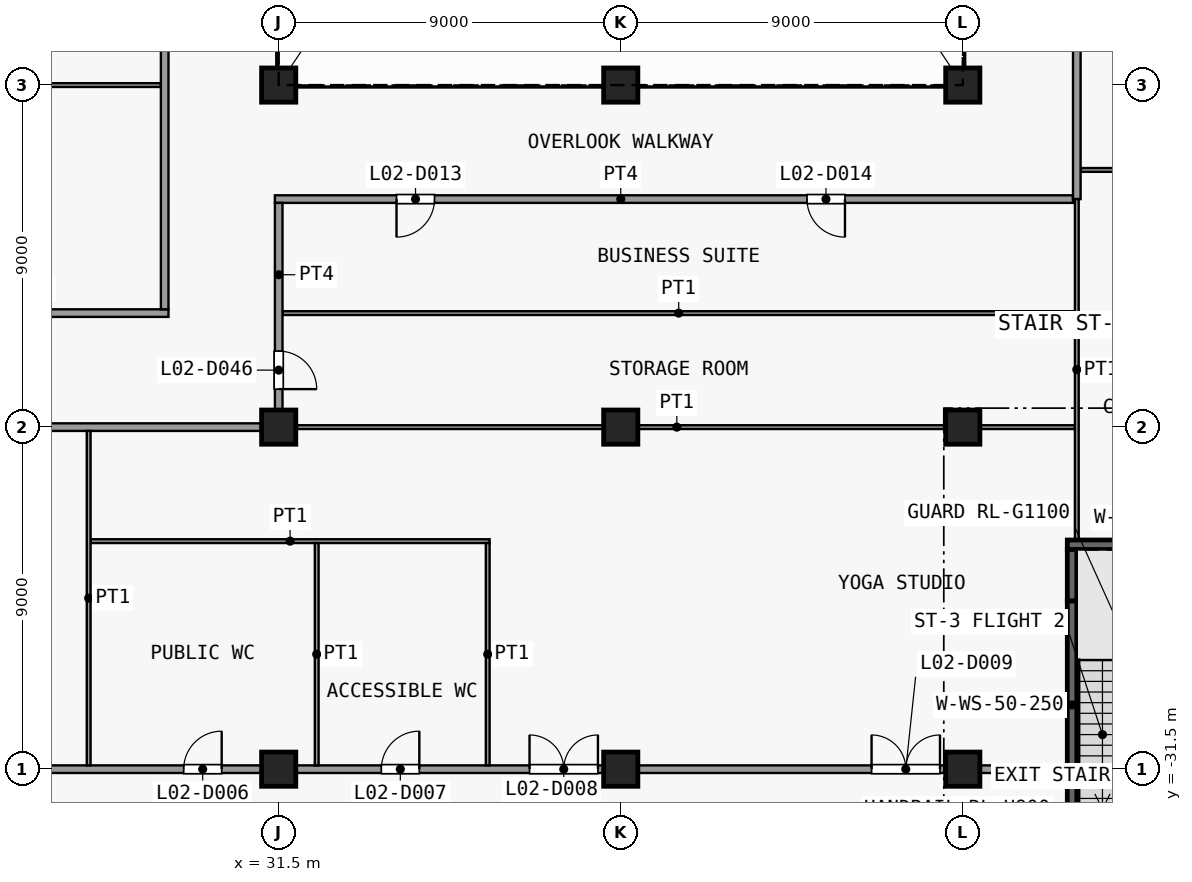
"""IFC4 building model, lengths in metres.
Left out: names, types, materials, properties, quantities, classifications, styles, units other than length and angle.
Written with IfcOpenShell. Run it as: python <this file> out.ifc"""

import sys

from ifc_helpers import new_model, si_unit, direction, frame, frame_2d, origin, origin_2d, place, context, subcontext, project, spatial, rectangle, extrude, element, fill, save


model = new_model("IFC4")
c1 = context("Model", 3, precision=1e-05, world=origin(), true_north=direction((0.0, 1.0)))
c2 = subcontext(c1, "Body", "Model", "MODEL_VIEW")
j1 = project(units=[si_unit("LENGTHUNIT", "METRE"), si_unit("PLANEANGLEUNIT", "RADIAN")], contexts=[c1])
p1 = place(None, origin())
s1 = spatial("IfcSite", under=j1, at=p1, CompositionType="ELEMENT")
p2 = place(p1, origin())
s2 = spatial("IfcBuilding", under=s1, at=p2, CompositionType="ELEMENT")
p3 = place(p2, frame((0.0, 0.0, 13.5)))
s3 = spatial("IfcBuildingStorey", under=s2, at=p3, CompositionType="ELEMENT", Elevation=13.5)
for number, where, z_axis, x_axis in (
    (1, (31.5, -31.5, 0.0), (0.0, 0.0, 1.0), (1.0, 0.0, 0.0)),
    (2, (31.5, -22.5, 0.0), (0.0, 0.0, 1.0), (1.0, 0.0, 0.0)),
    (3, (31.5, -13.5, 0.0), (0.0, 0.0, 1.0), (1.0, 0.0, 0.0)),
    (4, (40.5, -31.5, 0.0), (0.0, 0.0, 1.0), (1.0, 0.0, 0.0)),
    (5, (40.5, -22.5, 0.0), (0.0, 0.0, 1.0), (1.0, 0.0, 0.0)),
    (6, (40.5, -13.5, 0.0), (0.0, 0.0, 1.0), (1.0, 0.0, 0.0)),
    (7, (49.5, -31.5, 0.0), (0.0, 0.0, 1.0), (1.0, 0.0, 0.0)),
    (8, (49.5, -22.5, 0.0), (0.0, 0.0, 1.0), (1.0, 0.0, 0.0)),
    (9, (49.5, -13.5, 0.0), (0.0, 0.0, 1.0), (1.0, 0.0, 0.0)),
):
    element("IfcColumn", number, at=place(p3, frame(where, z_axis=z_axis, x_axis=x_axis)), inside=s3, PredefinedType="COLUMN", context=c2, shape_type="SweptSolid", body=[
        extrude(rectangle(XDim=0.9, YDim=0.9, at=origin_2d()), origin(), (0.0, 0.0, 1.0), 5.0),
    ])
p4 = place(p3, frame((52.375, -32.55, 0.0), z_axis=(0.0, 0.0, 1.0), x_axis=(0.0, 1.0, 0.0)))
e10 = element("IfcWall", 10, at=p4, inside=s3, PredefinedType="SHEAR", context=c2, shape_type="SweptSolid", body=[
    extrude(rectangle(XDim=5.48, YDim=0.25, at=frame_2d((2.74, 0.0))), origin(), (0.0, 0.0, 1.0), 4.65),
])
p5 = place(p3, frame((52.375, -27.07, 0.0), z_axis=(0.0, 0.0, 1.0), x_axis=(0.0, 1.0, 0.0)))
e11 = element("IfcWall", 11, at=p5, inside=s3, PredefinedType="SHEAR", context=c2, shape_type="SweptSolid", body=[
    extrude(rectangle(XDim=1.35, YDim=0.25, at=frame_2d((0.675, 0.0))), origin(), (0.0, 0.0, 1.0), 4.65),
])
p6 = place(p3, frame((52.25, -25.595, 0.0), z_axis=(0.0, 0.0, 1.0), x_axis=(1.0, 0.0, 0.0)))
e12 = element("IfcWall", 12, at=p6, inside=s3, PredefinedType="SHEAR", context=c2, shape_type="SweptSolid", body=[
    extrude(rectangle(XDim=3.35, YDim=0.25, at=frame_2d((1.675, 0.0))), origin(), (0.0, 0.0, 1.0), 4.65),
])
p7 = place(p3, frame((-25.9, -31.5, 0.0), z_axis=(0.0, 0.0, 1.0), x_axis=(1.0, 0.0, 0.0)))
e13 = element("IfcWall", 13, at=p7, inside=s3, PredefinedType="PARTITIONING", context=c2, shape_type="SweptSolid", body=[
    extrude(rectangle(XDim=78.15, YDim=0.2, at=frame_2d((39.075, 0.0))), origin(), (0.0, 0.0, 1.0), 4.65),
])
p8 = place(p7, frame((4.0, 0.0, 0.0)))
e14 = element("IfcOpeningElement", 14, at=p8, cuts=e13, PredefinedType="OPENING", context=c2, shape_type="SweptSolid", body=[
    extrude(rectangle(XDim=1.8, YDim=2.1, at=frame_2d((0.9, 1.05))), frame((0.0, 0.11, 0.0), z_axis=(0.0, -1.0, 0.0), x_axis=(1.0, 0.0, 0.0)), (0.0, 0.0, 1.0), 0.22),
])
p9 = place(p7, frame((16.0, 0.0, 0.0)))
e15 = element("IfcOpeningElement", 15, at=p9, cuts=e13, PredefinedType="OPENING", context=c2, shape_type="SweptSolid", body=[
    extrude(rectangle(XDim=1.8, YDim=2.1, at=frame_2d((0.9, 1.05))), frame((0.0, 0.11, 0.0), z_axis=(0.0, -1.0, 0.0), x_axis=(1.0, 0.0, 0.0)), (0.0, 0.0, 1.0), 0.22),
])
p10 = place(p7, frame((24.1, 0.0, 0.0)))
e16 = element("IfcOpeningElement", 16, at=p10, cuts=e13, PredefinedType="OPENING", context=c2, shape_type="SweptSolid", body=[
    extrude(rectangle(XDim=1.0, YDim=2.1, at=frame_2d((0.5, 1.05))), frame((0.0, 0.11, 0.0), z_axis=(0.0, -1.0, 0.0), x_axis=(1.0, 0.0, 0.0)), (0.0, 0.0, 1.0), 0.22),
])
p11 = place(p7, frame((37.0, 0.0, 0.0)))
e17 = element("IfcOpeningElement", 17, at=p11, cuts=e13, PredefinedType="OPENING", context=c2, shape_type="SweptSolid", body=[
    extrude(rectangle(XDim=1.0, YDim=2.1, at=frame_2d((0.5, 1.05))), frame((0.0, 0.11, 0.0), z_axis=(0.0, -1.0, 0.0), x_axis=(1.0, 0.0, 0.0)), (0.0, 0.0, 1.0), 0.22),
])
p12 = place(p7, frame((46.4, 0.0, 0.0)))
e18 = element("IfcOpeningElement", 18, at=p12, cuts=e13, PredefinedType="OPENING", context=c2, shape_type="SweptSolid", body=[
    extrude(rectangle(XDim=1.0, YDim=2.1, at=frame_2d((0.5, 1.05))), frame((0.0, 0.11, 0.0), z_axis=(0.0, -1.0, 0.0), x_axis=(1.0, 0.0, 0.0)), (0.0, 0.0, 1.0), 0.22),
])
p13 = place(p7, frame((54.9, 0.0, 0.0)))
e19 = element("IfcOpeningElement", 19, at=p13, cuts=e13, PredefinedType="OPENING", context=c2, shape_type="SweptSolid", body=[
    extrude(rectangle(XDim=1.0, YDim=2.1, at=frame_2d((0.5, 1.05))), frame((0.0, 0.11, 0.0), z_axis=(0.0, -1.0, 0.0), x_axis=(1.0, 0.0, 0.0)), (0.0, 0.0, 1.0), 0.22),
])
p14 = place(p7, frame((60.1, 0.0, 0.0)))
e20 = element("IfcOpeningElement", 20, at=p14, cuts=e13, PredefinedType="OPENING", context=c2, shape_type="SweptSolid", body=[
    extrude(rectangle(XDim=1.0, YDim=2.1, at=frame_2d((0.5, 1.05))), frame((0.0, 0.11, 0.0), z_axis=(0.0, -1.0, 0.0), x_axis=(1.0, 0.0, 0.0)), (0.0, 0.0, 1.0), 0.22),
])
p15 = place(p7, frame((64.0, 0.0, 0.0)))
e21 = element("IfcOpeningElement", 21, at=p15, cuts=e13, PredefinedType="OPENING", context=c2, shape_type="SweptSolid", body=[
    extrude(rectangle(XDim=1.8, YDim=2.1, at=frame_2d((0.9, 1.05))), frame((0.0, 0.11, 0.0), z_axis=(0.0, -1.0, 0.0), x_axis=(1.0, 0.0, 0.0)), (0.0, 0.0, 1.0), 0.22),
])
p16 = place(p7, frame((73.0, 0.0, 0.0)))
e22 = element("IfcOpeningElement", 22, at=p16, cuts=e13, PredefinedType="OPENING", context=c2, shape_type="SweptSolid", body=[
    extrude(rectangle(XDim=1.8, YDim=2.1, at=frame_2d((0.9, 1.05))), frame((0.0, 0.11, 0.0), z_axis=(0.0, -1.0, 0.0), x_axis=(1.0, 0.0, 0.0)), (0.0, 0.0, 1.0), 0.22),
])
p17 = place(p3, frame((26.55, -25.5, 0.0), z_axis=(0.0, 0.0, 1.0), x_axis=(1.0, 0.0, 0.0)))
e23 = element("IfcWall", 23, at=p17, inside=s3, PredefinedType="PARTITIONING", context=c2, shape_type="SweptSolid", body=[
    extrude(rectangle(XDim=10.5, YDim=0.1, at=frame_2d((5.25, 0.0))), origin(), (0.0, 0.0, 1.0), 4.65),
])
p18 = place(p3, frame((17.4, -22.5, 0.0), z_axis=(0.0, 0.0, 1.0), x_axis=(1.0, 0.0, 0.0)))
e24 = element("IfcWall", 24, at=p18, inside=s3, PredefinedType="PARTITIONING", context=c2, shape_type="SweptSolid", body=[
    extrude(rectangle(XDim=14.1, YDim=0.2, at=frame_2d((7.05, 0.0))), origin(), (0.0, 0.0, 1.0), 4.65),
])
p19 = place(p3, frame((31.5, -22.5, 0.0), z_axis=(0.0, 0.0, 1.0), x_axis=(1.0, 0.0, 0.0)))
e25 = element("IfcWall", 25, at=p19, inside=s3, PredefinedType="PARTITIONING", context=c2, shape_type="SweptSolid", body=[
    extrude(rectangle(XDim=20.95, YDim=0.1, at=frame_2d((10.475, 0.0))), origin(), (0.0, 0.0, 1.0), 4.65),
])
p20 = place(p3, frame((13.5, -19.5, 0.0), z_axis=(0.0, 0.0, 1.0), x_axis=(1.0, 0.0, 0.0)))
e26 = element("IfcWall", 26, at=p20, inside=s3, PredefinedType="PARTITIONING", context=c2, shape_type="SweptSolid", body=[
    extrude(rectangle(XDim=15.1, YDim=0.2, at=frame_2d((7.55, 0.0))), origin(), (0.0, 0.0, 1.0), 4.65),
])
p21 = place(p20, frame((7.0, 0.0, 0.0)))
e27 = element("IfcOpeningElement", 27, at=p21, cuts=e26, PredefinedType="OPENING", context=c2, shape_type="SweptSolid", body=[
    extrude(rectangle(XDim=1.0, YDim=2.1, at=frame_2d((0.5, 1.05))), frame((0.0, 0.11, 0.0), z_axis=(0.0, -1.0, 0.0), x_axis=(1.0, 0.0, 0.0)), (0.0, 0.0, 1.0), 0.22),
])
p22 = place(p3, frame((31.6, -19.5, 0.0), z_axis=(0.0, 0.0, 1.0), x_axis=(1.0, 0.0, 0.0)))
e28 = element("IfcWall", 28, at=p22, inside=s3, PredefinedType="PARTITIONING", context=c2, shape_type="SweptSolid", body=[
    extrude(rectangle(XDim=20.85, YDim=0.1, at=frame_2d((10.425, 0.0))), origin(), (0.0, 0.0, 1.0), 4.65),
])
p23 = place(p3, frame((31.4, -16.5, 0.0), z_axis=(0.0, 0.0, 1.0), x_axis=(1.0, 0.0, 0.0)))
e29 = element("IfcWall", 29, at=p23, inside=s3, PredefinedType="PARTITIONING", context=c2, shape_type="SweptSolid", body=[
    extrude(rectangle(XDim=21.0, YDim=0.2, at=frame_2d((10.5, 0.0))), origin(), (0.0, 0.0, 1.0), 4.65),
])
p24 = place(p23, frame((3.2, 0.0, 0.0)))
e30 = element("IfcOpeningElement", 30, at=p24, cuts=e29, PredefinedType="OPENING", context=c2, shape_type="SweptSolid", body=[
    extrude(rectangle(XDim=1.0, YDim=2.1, at=frame_2d((0.5, 1.05))), frame((0.0, 0.11, 0.0), z_axis=(0.0, -1.0, 0.0), x_axis=(1.0, 0.0, 0.0)), (0.0, 0.0, 1.0), 0.22),
])
p25 = place(p23, frame((14.0, 0.0, 0.0)))
e31 = element("IfcOpeningElement", 31, at=p25, cuts=e29, PredefinedType="OPENING", context=c2, shape_type="SweptSolid", body=[
    extrude(rectangle(XDim=1.0, YDim=2.1, at=frame_2d((0.5, 1.05))), frame((0.0, 0.11, 0.0), z_axis=(0.0, -1.0, 0.0), x_axis=(1.0, 0.0, 0.0)), (0.0, 0.0, 1.0), 0.22),
])
p26 = place(p3, frame((52.6, -15.733, 0.0), z_axis=(0.0, 0.0, 1.0), x_axis=(1.0, 0.0, 0.0)))
e32 = element("IfcWall", 32, at=p26, inside=s3, PredefinedType="PARTITIONING", context=c2, shape_type="SweptSolid", body=[
    extrude(rectangle(XDim=5.8, YDim=0.1, at=frame_2d((2.9, 0.0))), origin(), (0.0, 0.0, 1.0), 4.65),
])
p27 = place(p3, frame((13.5, -13.5, 0.0), z_axis=(0.0, 0.0, 1.0), x_axis=(1.0, 0.0, 0.0)))
e33 = element("IfcWall", 33, at=p27, inside=s3, PredefinedType="PARTITIONING", context=c2, shape_type="SweptSolid", body=[
    extrude(rectangle(XDim=14.9, YDim=0.1, at=frame_2d((7.45, 0.0))), origin(), (0.0, 0.0, 1.0), 4.65),
])
p28 = place(p3, frame((26.5, -31.4, 0.0), z_axis=(0.0, 0.0, 1.0), x_axis=(0.0, 1.0, 0.0)))
e34 = element("IfcWall", 34, at=p28, inside=s3, PredefinedType="PARTITIONING", context=c2, shape_type="SweptSolid", body=[
    extrude(rectangle(XDim=8.8, YDim=0.1, at=frame_2d((4.4, 0.0))), origin(), (0.0, 0.0, 1.0), 4.65),
])
p29 = place(p3, frame((28.5, -19.4, 0.0), z_axis=(0.0, 0.0, 1.0), x_axis=(0.0, 1.0, 0.0)))
e35 = element("IfcWall", 35, at=p29, inside=s3, PredefinedType="PARTITIONING", context=c2, shape_type="SweptSolid", body=[
    extrude(rectangle(XDim=14.8, YDim=0.2, at=frame_2d((7.4, 0.0))), origin(), (0.0, 0.0, 1.0), 4.65),
])
p30 = place(p3, frame((31.5, -22.4, 0.0), z_axis=(0.0, 0.0, 1.0), x_axis=(0.0, 1.0, 0.0)))
e36 = element("IfcWall", 36, at=p30, inside=s3, PredefinedType="PARTITIONING", context=c2, shape_type="SweptSolid", body=[
    extrude(rectangle(XDim=5.8, YDim=0.2, at=frame_2d((2.9, 0.0))), origin(), (0.0, 0.0, 1.0), 4.65),
])
p31 = place(p30, frame((0.9, 0.0, 0.0)))
e37 = element("IfcOpeningElement", 37, at=p31, cuts=e36, PredefinedType="OPENING", context=c2, shape_type="SweptSolid", body=[
    extrude(rectangle(XDim=1.0, YDim=2.1, at=frame_2d((0.5, 1.05))), frame((0.0, 0.11, 0.0), z_axis=(0.0, -1.0, 0.0), x_axis=(1.0, 0.0, 0.0)), (0.0, 0.0, 1.0), 0.22),
])
for number, where, z_axis, x_axis in (
    (38, (32.5, -31.4, 0.0), (0.0, 0.0, 1.0), (0.0, 1.0, 0.0)),
    (39, (37.0, -31.4, 0.0), (0.0, 0.0, 1.0), (0.0, 1.0, 0.0)),
):
    element("IfcWall", number, at=place(p3, frame(where, z_axis=z_axis, x_axis=x_axis)), inside=s3, PredefinedType="PARTITIONING", context=c2, shape_type="SweptSolid", body=[
        extrude(rectangle(XDim=5.85, YDim=0.1, at=frame_2d((2.925, 0.0))), origin(), (0.0, 0.0, 1.0), 4.65),
    ])
p32 = place(p3, frame((52.5, -16.5, 0.0), z_axis=(0.0, 0.0, 1.0), x_axis=(0.0, 1.0, 0.0)))
e40 = element("IfcWall", 40, at=p32, inside=s3, PredefinedType="PARTITIONING", context=c2, shape_type="SweptSolid", body=[
    extrude(rectangle(XDim=32.2, YDim=0.2, at=frame_2d((16.1, 0.0))), origin(), (0.0, 0.0, 1.0), 4.65),
])
p33 = place(p3, frame((52.5, -25.47, 0.0), z_axis=(0.0, 0.0, 1.0), x_axis=(0.0, 1.0, 0.0)))
e41 = element("IfcWall", 41, at=p33, inside=s3, PredefinedType="PARTITIONING", context=c2, shape_type="SweptSolid", body=[
    extrude(rectangle(XDim=8.97, YDim=0.1, at=frame_2d((4.485, 0.0))), origin(), (0.0, 0.0, 1.0), 4.65),
])
p34 = place(p13, origin())
e42 = element("IfcDoor", 42, at=p34, inside=s3, OperationType="SINGLE_SWING_LEFT", PredefinedType="DOOR", context=c2, shape_type="SweptSolid", body=[
    extrude(rectangle(XDim=1.0, YDim=2.1, at=frame_2d((0.5, 1.05))), frame((0.0, 0.025, 0.0), z_axis=(0.0, -1.0, 0.0), x_axis=(1.0, 0.0, 0.0)), (0.0, 0.0, 1.0), 0.05),
])
fill(e19, e42)
p35 = place(p14, origin())
e43 = element("IfcDoor", 43, at=p35, inside=s3, OperationType="SINGLE_SWING_LEFT", PredefinedType="DOOR", context=c2, shape_type="SweptSolid", body=[
    extrude(rectangle(XDim=1.0, YDim=2.1, at=frame_2d((0.5, 1.05))), frame((0.0, 0.025, 0.0), z_axis=(0.0, -1.0, 0.0), x_axis=(1.0, 0.0, 0.0)), (0.0, 0.0, 1.0), 0.05),
])
fill(e20, e43)
p36 = place(p15, origin())
e44 = element("IfcDoor", 44, at=p36, inside=s3, OperationType="DOUBLE_DOOR_SINGLE_SWING", PredefinedType="DOOR", context=c2, shape_type="SweptSolid", body=[
    extrude(rectangle(XDim=1.8, YDim=2.1, at=frame_2d((0.9, 1.05))), frame((0.0, 0.025, 0.0), z_axis=(0.0, -1.0, 0.0), x_axis=(1.0, 0.0, 0.0)), (0.0, 0.0, 1.0), 0.05),
])
fill(e21, e44)
p37 = place(p16, origin())
e45 = element("IfcDoor", 45, at=p37, inside=s3, OperationType="DOUBLE_DOOR_SINGLE_SWING", PredefinedType="DOOR", context=c2, shape_type="SweptSolid", body=[
    extrude(rectangle(XDim=1.8, YDim=2.1, at=frame_2d((0.9, 1.05))), frame((0.0, 0.025, 0.0), z_axis=(0.0, -1.0, 0.0), x_axis=(1.0, 0.0, 0.0)), (0.0, 0.0, 1.0), 0.05),
])
fill(e22, e45)
p38 = place(p24, origin())
e46 = element("IfcDoor", 46, at=p38, inside=s3, OperationType="SINGLE_SWING_LEFT", PredefinedType="DOOR", context=c2, shape_type="SweptSolid", body=[
    extrude(rectangle(XDim=1.0, YDim=2.1, at=frame_2d((0.5, 1.05))), frame((0.0, 0.025, 0.0), z_axis=(0.0, -1.0, 0.0), x_axis=(1.0, 0.0, 0.0)), (0.0, 0.0, 1.0), 0.05),
])
fill(e30, e46)
p39 = place(p25, origin())
e47 = element("IfcDoor", 47, at=p39, inside=s3, OperationType="SINGLE_SWING_RIGHT", PredefinedType="DOOR", context=c2, shape_type="SweptSolid", body=[
    extrude(rectangle(XDim=1.0, YDim=2.1, at=frame_2d((0.5, 1.05))), frame((0.0, 0.025, 0.0), z_axis=(0.0, -1.0, 0.0), x_axis=(1.0, 0.0, 0.0)), (0.0, 0.0, 1.0), 0.05),
])
fill(e31, e47)
p40 = place(p31, origin())
e48 = element("IfcDoor", 48, at=p40, inside=s3, OperationType="SINGLE_SWING_LEFT", PredefinedType="DOOR", context=c2, shape_type="SweptSolid", body=[
    extrude(rectangle(XDim=1.0, YDim=2.1, at=frame_2d((0.5, 1.05))), frame((0.0, 0.025, 0.0), z_axis=(0.0, -1.0, 0.0), x_axis=(1.0, 0.0, 0.0)), (0.0, 0.0, 1.0), 0.05),
])
fill(e37, e48)
save(model, sys.argv[1])
